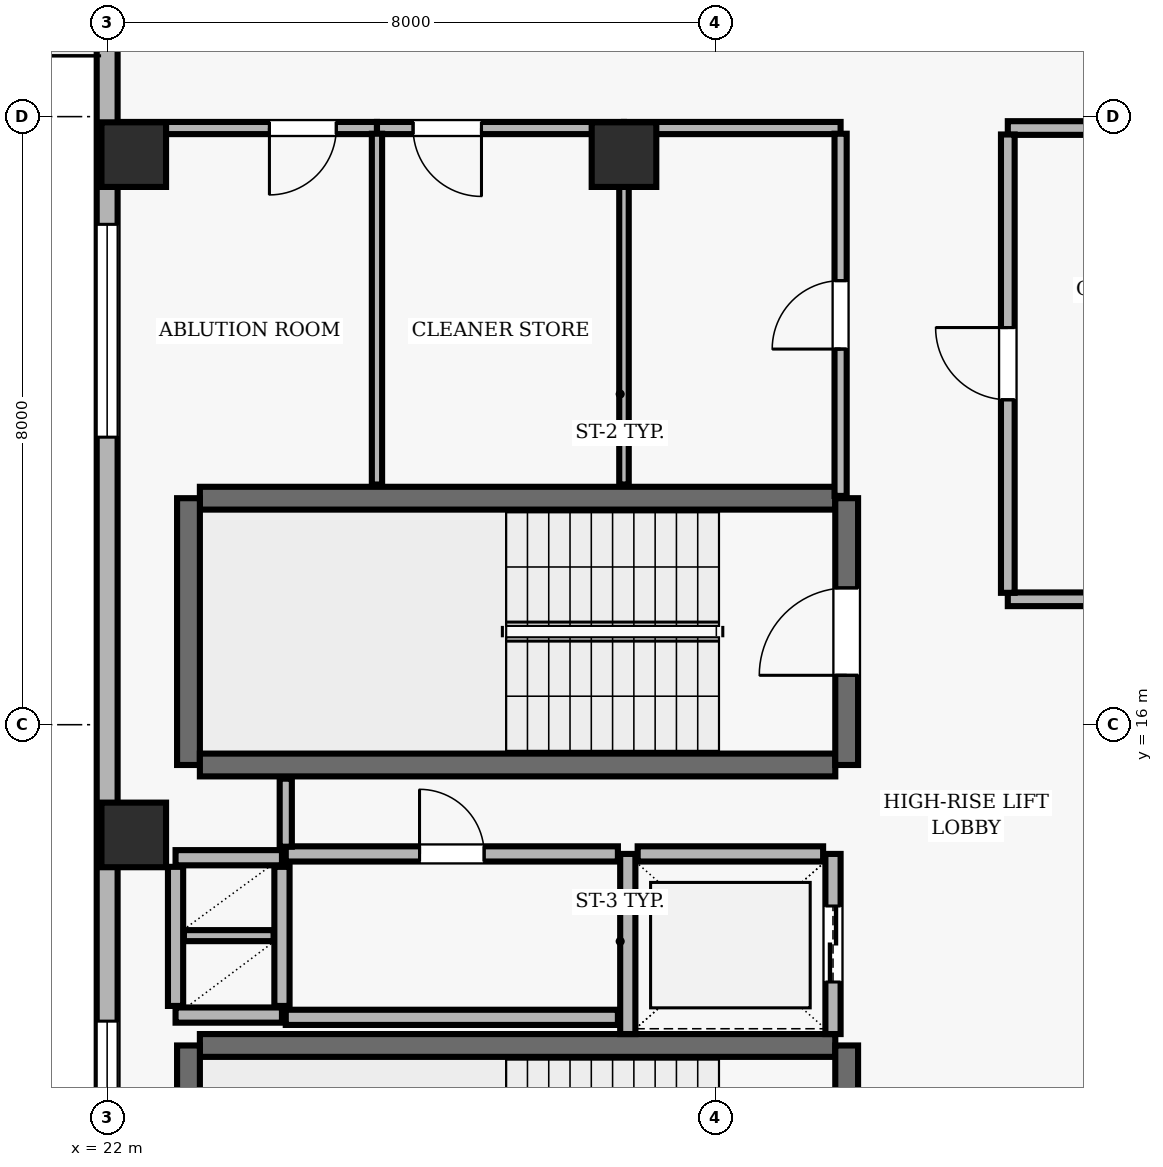
"""IFC4 building model, lengths in metres.
Left out: names, types, materials, properties, quantities, classifications, styles, units other than length and angle.
Written with IfcOpenShell. Run it as: python <this file> out.ifc"""

import sys

from ifc_helpers import new_model, si_unit, direction, frame, frame_2d, origin, origin_2d, place, context, subcontext, project, spatial, rectangle, extrude, element, fill, save


model = new_model("IFC4")
c1 = context("Model", 3, precision=1e-05, world=origin(), true_north=direction((0.0, 1.0)))
c2 = subcontext(c1, "Body", "Model", "MODEL_VIEW")
j1 = project(units=[si_unit("LENGTHUNIT", "METRE"), si_unit("PLANEANGLEUNIT", "RADIAN")], contexts=[c1])
p1 = place(None, origin())
s1 = spatial("IfcSite", under=j1, at=p1, CompositionType="ELEMENT")
p2 = place(p1, origin())
s2 = spatial("IfcBuilding", under=s1, at=p2, CompositionType="ELEMENT")
p3 = place(p2, frame((0.0, 0.0, 279.4)))
s3 = spatial("IfcBuildingStorey", under=s2, at=p3, CompositionType="ELEMENT", Elevation=279.4)
for number, where, z_axis, x_axis in (
    (1, (22.35, 14.55, 0.0), (0.0, 0.0, 1.0), (1.0, 0.0, 0.0)),
    (2, (22.35, 23.5, 0.0), (0.0, 0.0, 1.0), (1.0, 0.0, 0.0)),
    (3, (28.8, 23.5, 0.0), (0.0, 0.0, 1.0), (1.0, 0.0, 0.0)),
):
    element("IfcColumn", number, at=place(p3, frame(where, z_axis=z_axis, x_axis=x_axis)), inside=s3, PredefinedType="COLUMN", context=c2, shape_type="SweptSolid", body=[
        extrude(rectangle(XDim=0.85, YDim=0.85, at=origin_2d()), origin(), (0.0, 0.0, 1.0), 3.9),
    ])
p4 = place(p3, frame((22.0, 35.3, 0.0), z_axis=(0.0, 0.0, 1.0), x_axis=(0.0, -1.0, 0.0)))
e4 = element("IfcWall", 4, at=p4, inside=s3, PredefinedType="SOLIDWALL", context=c2, shape_type="SweptSolid", body=[
    extrude(rectangle(XDim=32.8, YDim=0.275, at=frame_2d((16.4, 0.0))), origin(), (0.0, 0.0, 1.0), 3.69),
])
p5 = place(p4, frame((7.3, 0.0, 0.0)))
e5 = element("IfcOpeningElement", 5, at=p5, cuts=e4, PredefinedType="OPENING", context=c2, shape_type="SweptSolid", body=[
    extrude(rectangle(XDim=1.0, YDim=2.2, at=frame_2d((0.5, 1.1))), frame((0.0, 0.147, 0.0), z_axis=(0.0, -1.0, 0.0), x_axis=(1.0, 0.0, 0.0)), (0.0, 0.0, 1.0), 0.295),
])
p6 = place(p4, frame((12.717, 0.0, 0.9)))
e6 = element("IfcOpeningElement", 6, at=p6, cuts=e4, PredefinedType="OPENING", context=c2, shape_type="SweptSolid", body=[
    extrude(rectangle(XDim=2.8, YDim=1.8, at=frame_2d((1.4, 0.9))), frame((0.0, 0.147, 0.0), z_axis=(0.0, -1.0, 0.0), x_axis=(1.0, 0.0, 0.0)), (0.0, 0.0, 1.0), 0.295),
])
p7 = place(p4, frame((23.2, 0.0, 0.9)))
e7 = element("IfcOpeningElement", 7, at=p7, cuts=e4, PredefinedType="OPENING", context=c2, shape_type="SweptSolid", body=[
    extrude(rectangle(XDim=2.8, YDim=1.8, at=frame_2d((1.4, 0.9))), frame((0.0, 0.147, 0.0), z_axis=(0.0, -1.0, 0.0), x_axis=(1.0, 0.0, 0.0)), (0.0, 0.0, 1.0), 0.295),
])
p8 = place(p3, frame((31.58, 18.98, 0.0), z_axis=(0.0, 0.0, 1.0), x_axis=(-1.0, 0.0, 0.0)))
e8 = element("IfcWall", 8, at=p8, inside=s3, PredefinedType="SHEAR", context=c2, shape_type="SweptSolid", body=[
    extrude(rectangle(XDim=8.36, YDim=0.3, at=frame_2d((4.18, 0.0))), origin(), (0.0, 0.0, 1.0), 3.69),
])
p9 = place(p3, frame((23.07, 18.98, 0.0), z_axis=(0.0, 0.0, 1.0), x_axis=(0.0, -1.0, 0.0)))
e9 = element("IfcWall", 9, at=p9, inside=s3, PredefinedType="SHEAR", context=c2, shape_type="SweptSolid", body=[
    extrude(rectangle(XDim=3.51, YDim=0.3, at=frame_2d((1.755, 0.0))), origin(), (0.0, 0.0, 1.0), 3.69),
])
p10 = place(p3, frame((23.22, 15.47, 0.0), z_axis=(0.0, 0.0, 1.0), x_axis=(1.0, 0.0, 0.0)))
e10 = element("IfcWall", 10, at=p10, inside=s3, PredefinedType="SHEAR", context=c2, shape_type="SweptSolid", body=[
    extrude(rectangle(XDim=8.36, YDim=0.3, at=frame_2d((4.18, 0.0))), origin(), (0.0, 0.0, 1.0), 3.69),
])
p11 = place(p3, frame((31.73, 15.47, 0.0), z_axis=(0.0, 0.0, 1.0), x_axis=(0.0, 1.0, 0.0)))
e11 = element("IfcWall", 11, at=p11, inside=s3, PredefinedType="SHEAR", context=c2, shape_type="SweptSolid", body=[
    extrude(rectangle(XDim=3.51, YDim=0.3, at=frame_2d((1.755, 0.0))), origin(), (0.0, 0.0, 1.0), 3.69),
])
p12 = place(p11, frame((1.18, 0.0, 0.0)))
e12 = element("IfcOpeningElement", 12, at=p12, cuts=e11, PredefinedType="OPENING", context=c2, shape_type="SweptSolid", body=[
    extrude(rectangle(XDim=1.15, YDim=2.15, at=frame_2d((0.575, 1.075))), frame((0.0, 0.16, 0.0), z_axis=(0.0, -1.0, 0.0), x_axis=(1.0, 0.0, 0.0)), (0.0, 0.0, 1.0), 0.32),
])
p13 = place(p3, frame((31.58, 11.78, 0.0), z_axis=(0.0, 0.0, 1.0), x_axis=(-1.0, 0.0, 0.0)))
e13 = element("IfcWall", 13, at=p13, inside=s3, PredefinedType="SHEAR", context=c2, shape_type="SweptSolid", body=[
    extrude(rectangle(XDim=8.36, YDim=0.3, at=frame_2d((4.18, 0.0))), origin(), (0.0, 0.0, 1.0), 3.69),
])
p14 = place(p3, frame((23.07, 11.78, 0.0), z_axis=(0.0, 0.0, 1.0), x_axis=(0.0, -1.0, 0.0)))
e14 = element("IfcWall", 14, at=p14, inside=s3, PredefinedType="SHEAR", context=c2, shape_type="SweptSolid", body=[
    extrude(rectangle(XDim=3.51, YDim=0.3, at=frame_2d((1.755, 0.0))), origin(), (0.0, 0.0, 1.0), 3.69),
])
p15 = place(p3, frame((31.73, 8.27, 0.0), z_axis=(0.0, 0.0, 1.0), x_axis=(0.0, 1.0, 0.0)))
e15 = element("IfcWall", 15, at=p15, inside=s3, PredefinedType="SHEAR", context=c2, shape_type="SweptSolid", body=[
    extrude(rectangle(XDim=3.51, YDim=0.3, at=frame_2d((1.755, 0.0))), origin(), (0.0, 0.0, 1.0), 3.69),
])
p16 = place(p15, frame((1.18, 0.0, 0.0)))
e16 = element("IfcOpeningElement", 16, at=p16, cuts=e15, PredefinedType="OPENING", context=c2, shape_type="SweptSolid", body=[
    extrude(rectangle(XDim=1.15, YDim=2.15, at=frame_2d((0.575, 1.075))), frame((0.0, 0.16, 0.0), z_axis=(0.0, -1.0, 0.0), x_axis=(1.0, 0.0, 0.0)), (0.0, 0.0, 1.0), 0.32),
])
p17 = place(p3, frame((28.85, 14.3, 0.0), z_axis=(0.0, 0.0, 1.0), x_axis=(0.0, -1.0, 0.0)))
e17 = element("IfcWall", 17, at=p17, inside=s3, PredefinedType="SOLIDWALL", context=c2, shape_type="SweptSolid", body=[
    extrude(rectangle(XDim=2.37, YDim=0.2, at=frame_2d((1.185, 0.0))), origin(), (0.0, 0.0, 1.0), 3.69),
])
p18 = place(p3, frame((31.55, 11.93, 0.0), z_axis=(0.0, 0.0, 1.0), x_axis=(0.0, 1.0, 0.0)))
e18 = element("IfcWall", 18, at=p18, inside=s3, PredefinedType="SOLIDWALL", context=c2, shape_type="SweptSolid", body=[
    extrude(rectangle(XDim=2.37, YDim=0.2, at=frame_2d((1.185, 0.0))), origin(), (0.0, 0.0, 1.0), 3.69),
])
p19 = place(p18, frame((0.685, 0.0, 0.0)))
e19 = element("IfcOpeningElement", 19, at=p19, cuts=e18, PredefinedType="OPENING", context=c2, shape_type="SweptSolid", body=[
    extrude(rectangle(XDim=1.0, YDim=2.1, at=frame_2d((0.5, 1.05))), frame((0.0, 0.11, 0.0), z_axis=(0.0, -1.0, 0.0), x_axis=(1.0, 0.0, 0.0)), (0.0, 0.0, 1.0), 0.22),
])
p20 = place(p3, frame((31.42, 14.3, 0.0), z_axis=(0.0, 0.0, 1.0), x_axis=(-1.0, 0.0, 0.0)))
e20 = element("IfcWall", 20, at=p20, inside=s3, PredefinedType="SOLIDWALL", context=c2, shape_type="SweptSolid", body=[
    extrude(rectangle(XDim=2.44, YDim=0.2, at=frame_2d((1.22, 0.0))), origin(), (0.0, 0.0, 1.0), 3.69),
])
for number, where, z_axis, x_axis in (
    (21, (22.9, 14.25, 0.0), (0.0, 0.0, 1.0), (1.0, 0.0, 0.0)),
    (22, (22.9, 12.18, 0.0), (0.0, 0.0, 1.0), (1.0, 0.0, 0.0)),
):
    element("IfcWall", number, at=place(p3, frame(where, z_axis=z_axis, x_axis=x_axis)), inside=s3, PredefinedType="SOLIDWALL", context=c2, shape_type="SweptSolid", body=[
        extrude(rectangle(XDim=1.4, YDim=0.2, at=frame_2d((0.7, 0.0))), origin(), (0.0, 0.0, 1.0), 3.69),
    ])
for number, where, z_axis, x_axis in (
    (23, (24.3, 12.3, 0.0), (0.0, 0.0, 1.0), (0.0, 1.0, 0.0)),
    (24, (22.9, 12.3, 0.0), (0.0, 0.0, 1.0), (0.0, 1.0, 0.0)),
):
    element("IfcWall", number, at=place(p3, frame(where, z_axis=z_axis, x_axis=x_axis)), inside=s3, PredefinedType="SOLIDWALL", context=c2, shape_type="SweptSolid", body=[
        extrude(rectangle(XDim=1.83, YDim=0.2, at=frame_2d((0.915, 0.0))), origin(), (0.0, 0.0, 1.0), 3.69),
    ])
p21 = place(p3, frame((23.01, 13.225, 0.0), z_axis=(0.0, 0.0, 1.0), x_axis=(1.0, 0.0, 0.0)))
e25 = element("IfcWall", 25, at=p21, inside=s3, PredefinedType="PARTITIONING", context=c2, shape_type="SweptSolid", body=[
    extrude(rectangle(XDim=1.18, YDim=0.145, at=frame_2d((0.59, 0.0))), origin(), (0.0, 0.0, 1.0), 3.69),
])
p22 = place(p3, frame((24.35, 12.15, 0.0), z_axis=(0.0, 0.0, 1.0), x_axis=(1.0, 0.0, 0.0)))
e26 = element("IfcWall", 26, at=p22, inside=s3, PredefinedType="SOLIDWALL", context=c2, shape_type="SweptSolid", body=[
    extrude(rectangle(XDim=4.37, YDim=0.2, at=frame_2d((2.185, 0.0))), origin(), (0.0, 0.0, 1.0), 3.69),
])
p23 = place(p3, frame((24.35, 14.3, 0.0), z_axis=(0.0, 0.0, 1.0), x_axis=(1.0, 0.0, 0.0)))
e27 = element("IfcWall", 27, at=p23, inside=s3, PredefinedType="SOLIDWALL", context=c2, shape_type="SweptSolid", body=[
    extrude(rectangle(XDim=4.37, YDim=0.2, at=frame_2d((2.185, 0.0))), origin(), (0.0, 0.0, 1.0), 3.69),
])
p24 = place(p23, frame((1.76, 0.0, 0.0)))
e28 = element("IfcOpeningElement", 28, at=p24, cuts=e27, PredefinedType="OPENING", context=c2, shape_type="SweptSolid", body=[
    extrude(rectangle(XDim=0.85, YDim=2.1, at=frame_2d((0.425, 1.05))), frame((0.0, 0.11, 0.0), z_axis=(0.0, -1.0, 0.0), x_axis=(1.0, 0.0, 0.0)), (0.0, 0.0, 1.0), 0.22),
])
p25 = place(p3, frame((25.55, 23.85, 0.0), z_axis=(0.0, 0.0, 1.0), x_axis=(-1.0, 0.0, 0.0)))
e29 = element("IfcWall", 29, at=p25, inside=s3, PredefinedType="PARTITIONING", context=c2, shape_type="SweptSolid", body=[
    extrude(rectangle(XDim=3.35, YDim=0.16, at=frame_2d((1.675, 0.0))), origin(), (0.0, 0.0, 1.0), 3.221),
])
p26 = place(p25, frame((0.535, 0.0, 0.0)))
e30 = element("IfcOpeningElement", 30, at=p26, cuts=e29, PredefinedType="OPENING", context=c2, shape_type="SweptSolid", body=[
    extrude(rectangle(XDim=0.88, YDim=2.1, at=frame_2d((0.44, 1.05))), frame((0.0, 0.09, 0.0), z_axis=(0.0, -1.0, 0.0), x_axis=(1.0, 0.0, 0.0)), (0.0, 0.0, 1.0), 0.18),
])
p27 = place(p3, frame((28.8, 23.85, 0.0), z_axis=(0.0, 0.0, 1.0), x_axis=(-1.0, 0.0, 0.0)))
e31 = element("IfcWall", 31, at=p27, inside=s3, PredefinedType="PARTITIONING", context=c2, shape_type="SweptSolid", body=[
    extrude(rectangle(XDim=3.25, YDim=0.16, at=frame_2d((1.625, 0.0))), origin(), (0.0, 0.0, 1.0), 3.221),
])
p28 = place(p27, frame((1.875, 0.0, 0.0)))
e32 = element("IfcOpeningElement", 32, at=p28, cuts=e31, PredefinedType="OPENING", context=c2, shape_type="SweptSolid", body=[
    extrude(rectangle(XDim=0.9, YDim=2.1, at=frame_2d((0.45, 1.05))), frame((0.0, 0.09, 0.0), z_axis=(0.0, -1.0, 0.0), x_axis=(1.0, 0.0, 0.0)), (0.0, 0.0, 1.0), 0.18),
])
p29 = place(p3, frame((31.65, 23.85, 0.0), z_axis=(0.0, 0.0, 1.0), x_axis=(-1.0, 0.0, 0.0)))
e33 = element("IfcWall", 33, at=p29, inside=s3, PredefinedType="PARTITIONING", context=c2, shape_type="SweptSolid", body=[
    extrude(rectangle(XDim=2.85, YDim=0.16, at=frame_2d((1.425, 0.0))), origin(), (0.0, 0.0, 1.0), 3.221),
])
p30 = place(p3, frame((33.85, 17.65, 0.0), z_axis=(0.0, 0.0, 1.0), x_axis=(1.0, 0.0, 0.0)))
e34 = element("IfcWall", 34, at=p30, inside=s3, PredefinedType="PARTITIONING", context=c2, shape_type="SweptSolid", body=[
    extrude(rectangle(XDim=1.3, YDim=0.18, at=frame_2d((0.65, 0.0))), origin(), (0.0, 0.0, 1.0), 3.69),
])
p31 = place(p3, frame((37.85, 23.85, 0.0), z_axis=(0.0, 0.0, 1.0), x_axis=(-1.0, 0.0, 0.0)))
e35 = element("IfcWall", 35, at=p31, inside=s3, PredefinedType="PARTITIONING", context=c2, shape_type="SweptSolid", body=[
    extrude(rectangle(XDim=4.0, YDim=0.18, at=frame_2d((2.0, 0.0))), origin(), (0.0, 0.0, 1.0), 3.221),
])
p32 = place(p3, frame((24.35, 15.29, 0.0), z_axis=(0.0, 0.0, 1.0), x_axis=(0.0, -1.0, 0.0)))
e36 = element("IfcWall", 36, at=p32, inside=s3, PredefinedType="PARTITIONING", context=c2, shape_type="SweptSolid", body=[
    extrude(rectangle(XDim=0.895, YDim=0.16, at=frame_2d((0.448, 0.0))), origin(), (0.0, 0.0, 1.0), 3.69),
])
p33 = place(p3, frame((25.55, 19.16, 0.0), z_axis=(0.0, 0.0, 1.0), x_axis=(0.0, 1.0, 0.0)))
e37 = element("IfcWall", 37, at=p33, inside=s3, PredefinedType="PARTITIONING", context=c2, shape_type="SweptSolid", body=[
    extrude(rectangle(XDim=4.615, YDim=0.135, at=frame_2d((2.308, 0.0))), origin(), (0.0, 0.0, 1.0), 3.69),
])
p34 = place(p3, frame((28.8, 23.775, 0.0), z_axis=(0.0, 0.0, 1.0), x_axis=(0.0, -1.0, 0.0)))
e38 = element("IfcWall", 38, at=p34, inside=s3, PredefinedType="PARTITIONING", context=c2, shape_type="SweptSolid", body=[
    extrude(rectangle(XDim=4.615, YDim=0.125, at=frame_2d((2.308, 0.0))), origin(), (0.0, 0.0, 1.0), 3.69),
])
p35 = place(p3, frame((31.65, 19.01, 0.0), z_axis=(0.0, 0.0, 1.0), x_axis=(0.0, 1.0, 0.0)))
e39 = element("IfcWall", 39, at=p35, inside=s3, PredefinedType="PARTITIONING", context=c2, shape_type="SweptSolid", body=[
    extrude(rectangle(XDim=4.765, YDim=0.16, at=frame_2d((2.382, 0.0))), origin(), (0.0, 0.0, 1.0), 3.69),
])
p36 = place(p35, frame((1.932, 0.0, 0.0)))
e40 = element("IfcOpeningElement", 40, at=p36, cuts=e39, PredefinedType="OPENING", context=c2, shape_type="SweptSolid", body=[
    extrude(rectangle(XDim=0.9, YDim=2.1, at=frame_2d((0.45, 1.05))), frame((0.0, 0.09, 0.0), z_axis=(0.0, -1.0, 0.0), x_axis=(1.0, 0.0, 0.0)), (0.0, 0.0, 1.0), 0.18),
])
p37 = place(p3, frame((33.85, 17.735, 0.0), z_axis=(0.0, 0.0, 1.0), x_axis=(0.0, 1.0, 0.0)))
e41 = element("IfcWall", 41, at=p37, inside=s3, PredefinedType="PARTITIONING", context=c2, shape_type="SweptSolid", body=[
    extrude(rectangle(XDim=6.03, YDim=0.18, at=frame_2d((3.015, 0.0))), origin(), (0.0, 0.0, 1.0), 3.69),
])
p38 = place(p37, frame((2.54, 0.0, 0.0)))
e42 = element("IfcOpeningElement", 42, at=p38, cuts=e41, PredefinedType="OPENING", context=c2, shape_type="SweptSolid", body=[
    extrude(rectangle(XDim=0.95, YDim=2.1, at=frame_2d((0.475, 1.05))), frame((0.0, 0.1, 0.0), z_axis=(0.0, -1.0, 0.0), x_axis=(1.0, 0.0, 0.0)), (0.0, 0.0, 1.0), 0.2),
])
p39 = place(p6, origin())
e43 = element("IfcWindow", 43, at=p39, inside=s3, PartitioningType="SINGLE_PANEL", PredefinedType="WINDOW", context=c2, shape_type="SweptSolid", body=[
    extrude(rectangle(XDim=2.8, YDim=1.8, at=frame_2d((1.4, 0.9))), frame((0.0, 0.03, 0.0), z_axis=(0.0, -1.0, 0.0), x_axis=(1.0, 0.0, 0.0)), (0.0, 0.0, 1.0), 0.06),
])
fill(e6, e43)
p40 = place(p7, origin())
e44 = element("IfcWindow", 44, at=p40, inside=s3, PartitioningType="SINGLE_PANEL", PredefinedType="WINDOW", context=c2, shape_type="SweptSolid", body=[
    extrude(rectangle(XDim=2.8, YDim=1.8, at=frame_2d((1.4, 0.9))), frame((0.0, 0.03, 0.0), z_axis=(0.0, -1.0, 0.0), x_axis=(1.0, 0.0, 0.0)), (0.0, 0.0, 1.0), 0.06),
])
fill(e7, e44)
p41 = place(p12, origin())
e45 = element("IfcDoor", 45, at=p41, inside=s3, OperationType="SINGLE_SWING_LEFT", PredefinedType="DOOR", context=c2, shape_type="SweptSolid", body=[
    extrude(rectangle(XDim=1.15, YDim=2.15, at=frame_2d((0.575, 1.075))), frame((0.0, 0.025, 0.0), z_axis=(0.0, -1.0, 0.0), x_axis=(1.0, 0.0, 0.0)), (0.0, 0.0, 1.0), 0.05),
])
fill(e12, e45)
p42 = place(p19, origin())
e46 = element("IfcDoor", 46, at=p42, inside=s3, OperationType="DOUBLE_DOOR_SLIDING", PredefinedType="DOOR", context=c2, shape_type="SweptSolid", body=[
    extrude(rectangle(XDim=1.0, YDim=2.1, at=frame_2d((0.5, 1.05))), frame((0.0, 0.025, 0.0), z_axis=(0.0, -1.0, 0.0), x_axis=(1.0, 0.0, 0.0)), (0.0, 0.0, 1.0), 0.05),
])
fill(e19, e46)
p43 = place(p38, origin())
e47 = element("IfcDoor", 47, at=p43, inside=s3, OperationType="SINGLE_SWING_RIGHT", PredefinedType="DOOR", context=c2, shape_type="SweptSolid", body=[
    extrude(rectangle(XDim=0.95, YDim=2.1, at=frame_2d((0.475, 1.05))), frame((0.0, 0.025, 0.0), z_axis=(0.0, -1.0, 0.0), x_axis=(1.0, 0.0, 0.0)), (0.0, 0.0, 1.0), 0.05),
])
fill(e42, e47)
p44 = place(p36, origin())
e48 = element("IfcDoor", 48, at=p44, inside=s3, OperationType="SINGLE_SWING_LEFT", PredefinedType="DOOR", context=c2, shape_type="SweptSolid", body=[
    extrude(rectangle(XDim=0.9, YDim=2.1, at=frame_2d((0.45, 1.05))), frame((0.0, 0.025, 0.0), z_axis=(0.0, -1.0, 0.0), x_axis=(1.0, 0.0, 0.0)), (0.0, 0.0, 1.0), 0.05),
])
fill(e40, e48)
p45 = place(p24, origin())
e49 = element("IfcDoor", 49, at=p45, inside=s3, OperationType="SINGLE_SWING_LEFT", PredefinedType="DOOR", context=c2, shape_type="SweptSolid", body=[
    extrude(rectangle(XDim=0.85, YDim=2.1, at=frame_2d((0.425, 1.05))), frame((0.0, 0.025, 0.0), z_axis=(0.0, -1.0, 0.0), x_axis=(1.0, 0.0, 0.0)), (0.0, 0.0, 1.0), 0.05),
])
fill(e28, e49)
p46 = place(p26, origin())
e50 = element("IfcDoor", 50, at=p46, inside=s3, OperationType="SINGLE_SWING_RIGHT", PredefinedType="DOOR", context=c2, shape_type="SweptSolid", body=[
    extrude(rectangle(XDim=0.88, YDim=2.1, at=frame_2d((0.44, 1.05))), frame((0.0, 0.025, 0.0), z_axis=(0.0, -1.0, 0.0), x_axis=(1.0, 0.0, 0.0)), (0.0, 0.0, 1.0), 0.05),
])
fill(e30, e50)
p47 = place(p28, origin())
e51 = element("IfcDoor", 51, at=p47, inside=s3, OperationType="SINGLE_SWING_LEFT", PredefinedType="DOOR", context=c2, shape_type="SweptSolid", body=[
    extrude(rectangle(XDim=0.9, YDim=2.1, at=frame_2d((0.45, 1.05))), frame((0.0, 0.025, 0.0), z_axis=(0.0, -1.0, 0.0), x_axis=(1.0, 0.0, 0.0)), (0.0, 0.0, 1.0), 0.05),
])
fill(e32, e51)
save(model, sys.argv[1])
